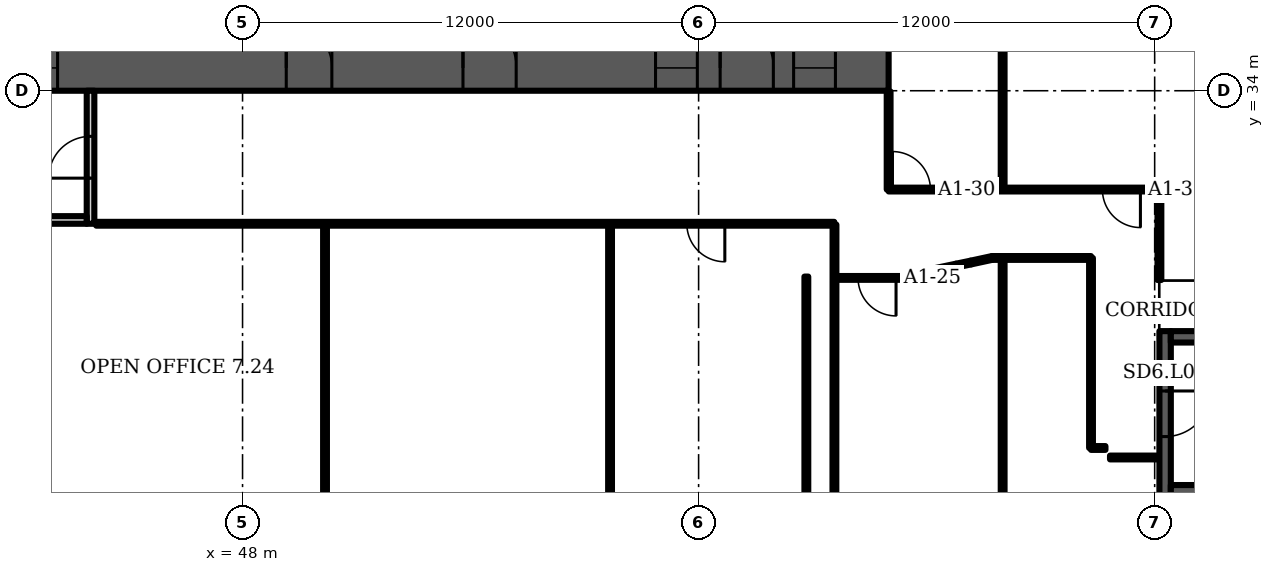
"""IFC4 building model, lengths in metres.
Left out: names, types, materials, properties, quantities, classifications, styles, units other than length and angle.
Written with IfcOpenShell. Run it as: python <this file> out.ifc"""

import sys

from ifc_helpers import new_model, si_unit, direction, frame, frame_2d, origin, place, context, subcontext, project, spatial, rectangle, extrude, element, fill, save


model = new_model("IFC4")
c1 = context("Model", 3, precision=1e-05, world=origin(), true_north=direction((0.0, 1.0)))
c2 = subcontext(c1, "Body", "Model", "MODEL_VIEW")
j1 = project(units=[si_unit("LENGTHUNIT", "METRE"), si_unit("PLANEANGLEUNIT", "RADIAN")], contexts=[c1])
p1 = place(None, origin())
s1 = spatial("IfcSite", under=j1, at=p1, CompositionType="ELEMENT")
p2 = place(p1, origin())
s2 = spatial("IfcBuilding", under=s1, at=p2, CompositionType="ELEMENT")
p3 = place(p2, frame((0.0, 0.0, 45.1)))
s3 = spatial("IfcBuildingStorey", under=s2, at=p3, CompositionType="ELEMENT", Elevation=45.1)
p4 = place(p3, frame((9.0, 34.6, 0.0), z_axis=(0.0, 0.0, 1.0), x_axis=(1.0, 0.0, 0.0)))
e1 = element("IfcWall", 1, at=p4, inside=s3, PredefinedType="SHEAR", context=c2, shape_type="SweptSolid", body=[
    extrude(rectangle(XDim=56.0, YDim=1.2, at=frame_2d((28.0, 0.0))), origin(), (0.0, 0.0, 1.0), 3.6),
])
p5 = place(p4, frame((2.0, 0.0, 0.0)))
e2 = element("IfcOpeningElement", 2, at=p5, cuts=e1, PredefinedType="OPENING", context=c2, shape_type="SweptSolid", body=[
    extrude(rectangle(XDim=1.0, YDim=2.1, at=frame_2d((0.5, 1.05))), frame((0.0, 0.61, 0.0), z_axis=(0.0, -1.0, 0.0), x_axis=(1.0, 0.0, 0.0)), (0.0, 0.0, 1.0), 1.22),
])
p6 = place(p4, frame((4.6, 0.0, 0.0)))
e3 = element("IfcOpeningElement", 3, at=p6, cuts=e1, PredefinedType="OPENING", context=c2, shape_type="SweptSolid", body=[
    extrude(rectangle(XDim=1.0, YDim=2.1, at=frame_2d((0.5, 1.05))), frame((0.0, 0.61, 0.0), z_axis=(0.0, -1.0, 0.0), x_axis=(1.0, 0.0, 0.0)), (0.0, 0.0, 1.0), 1.22),
])
p7 = place(p4, frame((7.867, 0.0, 0.0)))
e4 = element("IfcOpeningElement", 4, at=p7, cuts=e1, PredefinedType="OPENING", context=c2, shape_type="SweptSolid", body=[
    extrude(rectangle(XDim=1.1, YDim=2.1, at=frame_2d((0.55, 1.05))), frame((0.0, 0.61, 0.0), z_axis=(0.0, -1.0, 0.0), x_axis=(1.0, 0.0, 0.0)), (0.0, 0.0, 1.0), 1.22),
])
p8 = place(p4, frame((12.033, 0.0, 0.0)))
e5 = element("IfcOpeningElement", 5, at=p8, cuts=e1, PredefinedType="OPENING", context=c2, shape_type="SweptSolid", body=[
    extrude(rectangle(XDim=1.1, YDim=2.1, at=frame_2d((0.55, 1.05))), frame((0.0, 0.61, 0.0), z_axis=(0.0, -1.0, 0.0), x_axis=(1.0, 0.0, 0.0)), (0.0, 0.0, 1.0), 1.22),
])
p9 = place(p4, frame((9.8, 0.0, 0.0)))
e6 = element("IfcOpeningElement", 6, at=p9, cuts=e1, PredefinedType="OPENING", context=c2, shape_type="SweptSolid", body=[
    extrude(rectangle(XDim=1.4, YDim=2.1, at=frame_2d((0.7, 1.05))), frame((0.0, 0.61, 0.0), z_axis=(0.0, -1.0, 0.0), x_axis=(1.0, 0.0, 0.0)), (0.0, 0.0, 1.0), 1.22),
])
p10 = place(p4, frame((14.65, 0.0, 0.0)))
e7 = element("IfcOpeningElement", 7, at=p10, cuts=e1, PredefinedType="OPENING", context=c2, shape_type="SweptSolid", body=[
    extrude(rectangle(XDim=1.2, YDim=2.1, at=frame_2d((0.6, 1.05))), frame((0.0, 0.61, 0.0), z_axis=(0.0, -1.0, 0.0), x_axis=(1.0, 0.0, 0.0)), (0.0, 0.0, 1.0), 1.22),
])
p11 = place(p4, frame((21.867, 0.0, 0.0)))
e8 = element("IfcOpeningElement", 8, at=p11, cuts=e1, PredefinedType="OPENING", context=c2, shape_type="SweptSolid", body=[
    extrude(rectangle(XDim=1.1, YDim=2.1, at=frame_2d((0.55, 1.05))), frame((0.0, 0.61, 0.0), z_axis=(0.0, -1.0, 0.0), x_axis=(1.0, 0.0, 0.0)), (0.0, 0.0, 1.0), 1.22),
])
p12 = place(p4, frame((26.033, 0.0, 0.0)))
e9 = element("IfcOpeningElement", 9, at=p12, cuts=e1, PredefinedType="OPENING", context=c2, shape_type="SweptSolid", body=[
    extrude(rectangle(XDim=1.1, YDim=2.1, at=frame_2d((0.55, 1.05))), frame((0.0, 0.61, 0.0), z_axis=(0.0, -1.0, 0.0), x_axis=(1.0, 0.0, 0.0)), (0.0, 0.0, 1.0), 1.22),
])
p13 = place(p4, frame((23.8, 0.0, 0.0)))
e10 = element("IfcOpeningElement", 10, at=p13, cuts=e1, PredefinedType="OPENING", context=c2, shape_type="SweptSolid", body=[
    extrude(rectangle(XDim=1.4, YDim=2.1, at=frame_2d((0.7, 1.05))), frame((0.0, 0.61, 0.0), z_axis=(0.0, -1.0, 0.0), x_axis=(1.0, 0.0, 0.0)), (0.0, 0.0, 1.0), 1.22),
])
p14 = place(p4, frame((28.867, 0.0, 0.0)))
e11 = element("IfcOpeningElement", 11, at=p14, cuts=e1, PredefinedType="OPENING", context=c2, shape_type="SweptSolid", body=[
    extrude(rectangle(XDim=1.1, YDim=2.1, at=frame_2d((0.55, 1.05))), frame((0.0, 0.61, 0.0), z_axis=(0.0, -1.0, 0.0), x_axis=(1.0, 0.0, 0.0)), (0.0, 0.0, 1.0), 1.22),
])
p15 = place(p4, frame((33.033, 0.0, 0.0)))
e12 = element("IfcOpeningElement", 12, at=p15, cuts=e1, PredefinedType="OPENING", context=c2, shape_type="SweptSolid", body=[
    extrude(rectangle(XDim=1.1, YDim=2.1, at=frame_2d((0.55, 1.05))), frame((0.0, 0.61, 0.0), z_axis=(0.0, -1.0, 0.0), x_axis=(1.0, 0.0, 0.0)), (0.0, 0.0, 1.0), 1.22),
])
p16 = place(p4, frame((40.15, 0.0, 0.0)))
e13 = element("IfcOpeningElement", 13, at=p16, cuts=e1, PredefinedType="OPENING", context=c2, shape_type="SweptSolid", body=[
    extrude(rectangle(XDim=1.2, YDim=2.1, at=frame_2d((0.6, 1.05))), frame((0.0, 0.61, 0.0), z_axis=(0.0, -1.0, 0.0), x_axis=(1.0, 0.0, 0.0)), (0.0, 0.0, 1.0), 1.22),
])
p17 = place(p4, frame((44.8, 0.0, 0.0)))
e14 = element("IfcOpeningElement", 14, at=p17, cuts=e1, PredefinedType="OPENING", context=c2, shape_type="SweptSolid", body=[
    extrude(rectangle(XDim=1.4, YDim=2.1, at=frame_2d((0.7, 1.05))), frame((0.0, 0.61, 0.0), z_axis=(0.0, -1.0, 0.0), x_axis=(1.0, 0.0, 0.0)), (0.0, 0.0, 1.0), 1.22),
])
p18 = place(p4, frame((49.867, 0.0, 0.0)))
e15 = element("IfcOpeningElement", 15, at=p18, cuts=e1, PredefinedType="OPENING", context=c2, shape_type="SweptSolid", body=[
    extrude(rectangle(XDim=1.1, YDim=2.1, at=frame_2d((0.55, 1.05))), frame((0.0, 0.61, 0.0), z_axis=(0.0, -1.0, 0.0), x_axis=(1.0, 0.0, 0.0)), (0.0, 0.0, 1.0), 1.22),
])
p19 = place(p4, frame((53.5, 0.0, 0.0)))
e16 = element("IfcOpeningElement", 16, at=p19, cuts=e1, PredefinedType="OPENING", context=c2, shape_type="SweptSolid", body=[
    extrude(rectangle(XDim=1.1, YDim=2.1, at=frame_2d((0.55, 1.05))), frame((0.0, 0.61, 0.0), z_axis=(0.0, -1.0, 0.0), x_axis=(1.0, 0.0, 0.0)), (0.0, 0.0, 1.0), 1.22),
])
p20 = place(p4, frame((51.567, 0.0, 0.0)))
e17 = element("IfcOpeningElement", 17, at=p20, cuts=e1, PredefinedType="OPENING", context=c2, shape_type="SweptSolid", body=[
    extrude(rectangle(XDim=1.4, YDim=2.1, at=frame_2d((0.7, 1.05))), frame((0.0, 0.61, 0.0), z_axis=(0.0, -1.0, 0.0), x_axis=(1.0, 0.0, 0.0)), (0.0, 0.0, 1.0), 1.22),
])
p21 = place(p3, frame((44.0, 30.5, 0.0), z_axis=(0.0, 0.0, 1.0), x_axis=(0.0, 1.0, 0.0)))
e18 = element("IfcWall", 18, at=p21, inside=s3, PredefinedType="PARTITIONING", context=c2, shape_type="SweptSolid", body=[
    extrude(rectangle(XDim=3.5, YDim=0.2, at=frame_2d((1.75, 0.0))), origin(), (0.0, 0.0, 1.0), 3.2),
])
p22 = place(p21, frame((1.2, 0.0, 0.0)))
e19 = element("IfcOpeningElement", 19, at=p22, cuts=e18, PredefinedType="OPENING", context=c2, shape_type="SweptSolid", body=[
    extrude(rectangle(XDim=1.1, YDim=2.1, at=frame_2d((0.55, 1.05))), frame((0.0, 0.11, 0.0), z_axis=(0.0, -1.0, 0.0), x_axis=(1.0, 0.0, 0.0)), (0.0, 0.0, 1.0), 0.22),
])
p23 = place(p3, frame((41.1, 30.6, 0.0), z_axis=(0.0, 0.0, 1.0), x_axis=(1.0, 0.0, 0.0)))
e20 = element("IfcWall", 20, at=p23, inside=s3, PredefinedType="PARTITIONING", context=c2, shape_type="SweptSolid", body=[
    extrude(rectangle(XDim=2.8, YDim=0.2, at=frame_2d((1.4, 0.0))), origin(), (0.0, 0.0, 1.0), 3.2),
])
p24 = place(p3, frame((72.275, 23.325, 0.0), z_axis=(0.0, 0.0, 1.0), x_axis=(0.0, 1.0, 0.0)))
e21 = element("IfcWall", 21, at=p24, inside=s3, PredefinedType="SHEAR", context=c2, shape_type="SweptSolid", body=[
    extrude(rectangle(XDim=4.35, YDim=0.3, at=frame_2d((2.175, 0.0))), origin(), (0.0, 0.0, 1.0), 3.2),
])
p25 = place(p24, frame((1.575, 0.0, 0.0)))
e22 = element("IfcOpeningElement", 22, at=p25, cuts=e21, PredefinedType="OPENING", context=c2, shape_type="SweptSolid", body=[
    extrude(rectangle(XDim=1.2, YDim=2.1, at=frame_2d((0.6, 1.05))), frame((0.0, 0.16, 0.0), z_axis=(0.0, -1.0, 0.0), x_axis=(1.0, 0.0, 0.0)), (0.0, 0.0, 1.0), 0.32),
])
for number, where, z_axis, x_axis in (
    (23, (50.17, 14.24, 0.0), (0.0, 0.0, 1.0), (0.0, 1.0, 0.0)),
    (24, (57.67, 14.24, 0.0), (0.0, 0.0, 1.0), (0.0, 1.0, 0.0)),
):
    element("IfcWall", number, at=place(p3, frame(where, z_axis=z_axis, x_axis=x_axis)), inside=s3, PredefinedType="PARTITIONING", context=c2, shape_type="SweptSolid", body=[
        extrude(rectangle(XDim=16.26, YDim=0.1, at=frame_2d((8.13, 0.0))), origin(), (0.0, 0.0, 1.0), 3.2),
    ])
p26 = place(p3, frame((62.835, 20.175, 0.0), z_axis=(0.0, 0.0, 1.0), x_axis=(0.0, 1.0, 0.0)))
e25 = element("IfcWall", 25, at=p26, inside=s3, PredefinedType="PARTITIONING", context=c2, shape_type="SweptSolid", body=[
    extrude(rectangle(XDim=8.935, YDim=0.1, at=frame_2d((4.468, 0.0))), origin(), (0.0, 0.0, 1.0), 3.2),
])
p27 = place(p3, frame((63.57, 14.245, 0.0), z_axis=(0.0, 0.0, 1.0), x_axis=(0.000331, 1.000002, 0.0)))
e26 = element("IfcWall", 26, at=p27, inside=s3, PredefinedType="PARTITIONING", context=c2, shape_type="SweptSolid", body=[
    extrude(rectangle(XDim=16.233, YDim=0.1, at=frame_2d((8.117, 0.0))), origin(), (0.0, 0.0, 1.0), 3.2),
])
p28 = place(p3, frame((63.575, 29.075, 0.0), z_axis=(0.0, 0.0, 1.0), x_axis=(1.0, 0.0, 0.0)))
e27 = element("IfcWall", 27, at=p28, inside=s3, PredefinedType="PARTITIONING", context=c2, shape_type="SweptSolid", body=[
    extrude(rectangle(XDim=2.08, YDim=0.1, at=frame_2d((1.04, 0.0))), origin(), (0.0, 0.0, 1.0), 3.2),
])
p29 = place(p28, frame((0.62, 0.0, 0.0)))
e28 = element("IfcOpeningElement", 28, at=p29, cuts=e27, PredefinedType="OPENING", context=c2, shape_type="SweptSolid", body=[
    extrude(rectangle(XDim=1.0, YDim=2.1, at=frame_2d((0.5, 1.05))), frame((0.0, 0.06, 0.0), z_axis=(0.0, -1.0, 0.0), x_axis=(1.0, 0.0, 0.0)), (0.0, 0.0, 1.0), 0.12),
])
p30 = place(p3, frame((65.0, 31.4, 0.0), z_axis=(0.0, 0.0, 1.0), x_axis=(0.0, 1.0, 0.0)))
e29 = element("IfcWall", 29, at=p30, inside=s3, PredefinedType="PARTITIONING", context=c2, shape_type="SweptSolid", body=[
    extrude(rectangle(XDim=2.58, YDim=0.1, at=frame_2d((1.29, 0.0))), origin(), (0.0, 0.0, 1.0), 3.2),
])
p31 = place(p3, frame((65.0, 31.4, 0.0), z_axis=(0.0, 0.0, 1.0), x_axis=(1.0, 0.0, 0.0)))
e30 = element("IfcWall", 30, at=p31, inside=s3, PredefinedType="PARTITIONING", context=c2, shape_type="SweptSolid", body=[
    extrude(rectangle(XDim=7.125, YDim=0.1, at=frame_2d((3.562, 0.0))), origin(), (0.0, 0.0, 1.0), 3.2),
])
p32 = place(p31, frame((0.1, 0.0, 0.0)))
e31 = element("IfcOpeningElement", 31, at=p32, cuts=e30, PredefinedType="OPENING", context=c2, shape_type="SweptSolid", body=[
    extrude(rectangle(XDim=1.0, YDim=2.1, at=frame_2d((0.5, 1.05))), frame((0.0, 0.06, 0.0), z_axis=(0.0, -1.0, 0.0), x_axis=(1.0, 0.0, 0.0)), (0.0, 0.0, 1.0), 0.12),
])
p33 = place(p31, frame((5.625, 0.0, 0.0)))
e32 = element("IfcOpeningElement", 32, at=p33, cuts=e30, PredefinedType="OPENING", context=c2, shape_type="SweptSolid", body=[
    extrude(rectangle(XDim=1.0, YDim=2.1, at=frame_2d((0.5, 1.05))), frame((0.0, 0.06, 0.0), z_axis=(0.0, -1.0, 0.0), x_axis=(1.0, 0.0, 0.0)), (0.0, 0.0, 1.0), 0.12),
])
p34 = place(p3, frame((65.655, 29.075, 0.0), z_axis=(0.0, 0.0, 1.0), x_axis=(0.671773, 0.740757, 0.0)))
e33 = element("IfcWall", 33, at=p34, inside=s3, PredefinedType="PARTITIONING", context=c2, shape_type="SweptSolid", body=[
    extrude(rectangle(XDim=0.149, YDim=0.1, at=frame_2d((0.074, 0.0))), origin(), (0.0, 0.0, 1.0), 3.2),
])
p35 = place(p3, frame((65.755, 29.185, 0.0), z_axis=(0.0, 0.0, 1.0), x_axis=(0.978739, 0.205118, 0.0)))
e34 = element("IfcWall", 34, at=p35, inside=s3, PredefinedType="PARTITIONING", context=c2, shape_type="SweptSolid", body=[
    extrude(rectangle(XDim=1.047, YDim=0.1, at=frame_2d((0.524, 0.0))), origin(), (0.0, 0.0, 1.0), 3.2),
])
p36 = place(p3, frame((66.78, 29.4, 0.0), z_axis=(0.0, 0.0, 1.0), x_axis=(0.979048, 0.203632, 0.0)))
e35 = element("IfcWall", 35, at=p36, inside=s3, PredefinedType="PARTITIONING", context=c2, shape_type="SweptSolid", body=[
    extrude(rectangle(XDim=0.393, YDim=0.1, at=frame_2d((0.197, 0.0))), origin(), (0.0, 0.0, 1.0), 3.2),
])
p37 = place(p3, frame((67.165, 29.48, 0.0), z_axis=(0.0, 0.0, 1.0), x_axis=(0.977367, 0.211555, 0.0)))
e36 = element("IfcWall", 36, at=p37, inside=s3, PredefinedType="PARTITIONING", context=c2, shape_type="SweptSolid", body=[
    extrude(rectangle(XDim=0.568, YDim=0.1, at=frame_2d((0.284, 0.0))), origin(), (0.0, 0.0, 1.0), 3.2),
])
p38 = place(p3, frame((67.72, 29.6, 0.0), z_axis=(0.0, 0.0, 1.0), x_axis=(1.0, 0.0, 0.0)))
e37 = element("IfcWall", 37, at=p38, inside=s3, PredefinedType="PARTITIONING", context=c2, shape_type="SweptSolid", body=[
    extrude(rectangle(XDim=2.605, YDim=0.1, at=frame_2d((1.302, 0.0))), origin(), (0.0, 0.0, 1.0), 3.2),
])
p39 = place(p3, frame((68.0, 14.24, 0.0), z_axis=(0.0, 0.0, 1.0), x_axis=(0.0, 1.0, 0.0)))
e38 = element("IfcWall", 38, at=p39, inside=s3, PredefinedType="PARTITIONING", context=c2, shape_type="SweptSolid", body=[
    extrude(rectangle(XDim=15.36, YDim=0.1, at=frame_2d((7.68, 0.0))), origin(), (0.0, 0.0, 1.0), 3.2),
])
p40 = place(p3, frame((68.0, 31.4, 0.0), z_axis=(0.0, 0.0, 1.0), x_axis=(0.0, 1.0, 0.0)))
e39 = element("IfcWall", 39, at=p40, inside=s3, PredefinedType="PARTITIONING", context=c2, shape_type="SweptSolid", body=[
    extrude(rectangle(XDim=8.39, YDim=0.1, at=frame_2d((4.195, 0.0))), origin(), (0.0, 0.0, 1.0), 3.2),
])
p41 = place(p3, frame((70.325, 24.6, 0.0), z_axis=(0.0, 0.0, 1.0), x_axis=(0.0, 1.0, 0.0)))
e40 = element("IfcWall", 40, at=p41, inside=s3, PredefinedType="PARTITIONING", context=c2, shape_type="SweptSolid", body=[
    extrude(rectangle(XDim=5.0, YDim=0.1, at=frame_2d((2.5, 0.0))), origin(), (0.0, 0.0, 1.0), 3.2),
])
p42 = place(p3, frame((70.325, 24.6, 0.0), z_axis=(0.0, 0.0, 1.0), x_axis=(1.0, 0.0, 0.0)))
e41 = element("IfcWall", 41, at=p42, inside=s3, PredefinedType="PARTITIONING", context=c2, shape_type="SweptSolid", body=[
    extrude(rectangle(XDim=0.38, YDim=0.1, at=frame_2d((0.19, 0.0))), origin(), (0.0, 0.0, 1.0), 3.2),
])
p43 = place(p3, frame((70.825, 24.35, 0.0), z_axis=(0.0, 0.0, 1.0), x_axis=(1.0, 0.0, 0.0)))
e42 = element("IfcWall", 42, at=p43, inside=s3, PredefinedType="PARTITIONING", context=c2, shape_type="SweptSolid", body=[
    extrude(rectangle(XDim=1.28, YDim=0.1, at=frame_2d((0.64, 0.0))), origin(), (0.0, 0.0, 1.0), 3.2),
])
p44 = place(p3, frame((72.125, 29.02, 0.0), z_axis=(0.0, 0.0, 1.0), x_axis=(0.0, 1.0, 0.0)))
e43 = element("IfcWall", 43, at=p44, inside=s3, PredefinedType="PARTITIONING", context=c2, shape_type="SweptSolid", body=[
    extrude(rectangle(XDim=2.38, YDim=0.1, at=frame_2d((1.19, 0.0))), origin(), (0.0, 0.0, 1.0), 3.2),
])
p45 = place(p3, frame((44.15, 30.5, 0.0), z_axis=(0.0, 0.0, 1.0), x_axis=(1.0, 0.0, 0.0)))
e44 = element("IfcWall", 44, at=p45, inside=s3, PredefinedType="PARTITIONING", context=c2, shape_type="SweptSolid", body=[
    extrude(rectangle(XDim=19.42, YDim=0.1, at=frame_2d((9.71, 0.0))), origin(), (0.0, 0.0, 1.0), 3.2),
])
p46 = place(p45, frame((15.54, 0.0, 0.0)))
e45 = element("IfcOpeningElement", 45, at=p46, cuts=e44, PredefinedType="OPENING", context=c2, shape_type="SweptSolid", body=[
    extrude(rectangle(XDim=1.0, YDim=2.1, at=frame_2d((0.5, 1.05))), frame((0.0, 0.06, 0.0), z_axis=(0.0, -1.0, 0.0), x_axis=(1.0, 0.0, 0.0)), (0.0, 0.0, 1.0), 0.12),
])
for number, where, z_axis, x_axis in (
    (46, (72.425, 23.475, 0.0), (0.0, 0.0, 1.0), (1.0, 0.0, 0.0)),
    (47, (72.425, 27.525, 0.0), (0.0, 0.0, 1.0), (1.0, 0.0, 0.0)),
):
    element("IfcWall", number, at=place(p3, frame(where, z_axis=z_axis, x_axis=x_axis)), inside=s3, PredefinedType="SHEAR", context=c2, shape_type="SweptSolid", body=[
        extrude(rectangle(XDim=7.5, YDim=0.3, at=frame_2d((3.75, 0.0))), origin(), (0.0, 0.0, 1.0), 3.2),
    ])
p47 = place(p15, origin())
e48 = element("IfcDoor", 48, at=p47, inside=s3, OperationType="DOUBLE_DOOR_SLIDING", PredefinedType="DOOR", context=c2, shape_type="SweptSolid", body=[
    extrude(rectangle(XDim=1.1, YDim=2.1, at=frame_2d((0.55, 1.05))), frame((0.0, 0.025, 0.0), z_axis=(0.0, -1.0, 0.0), x_axis=(1.0, 0.0, 0.0)), (0.0, 0.0, 1.0), 0.05),
])
fill(e12, e48)
p48 = place(p16, origin())
e49 = element("IfcDoor", 49, at=p48, inside=s3, OperationType="SINGLE_SWING_LEFT", PredefinedType="DOOR", context=c2, shape_type="SweptSolid", body=[
    extrude(rectangle(XDim=1.2, YDim=2.1, at=frame_2d((0.6, 1.05))), frame((0.0, 0.025, 0.0), z_axis=(0.0, -1.0, 0.0), x_axis=(1.0, 0.0, 0.0)), (0.0, 0.0, 1.0), 0.05),
])
fill(e13, e49)
p49 = place(p17, origin())
e50 = element("IfcDoor", 50, at=p49, inside=s3, OperationType="DOUBLE_DOOR_SINGLE_SWING", PredefinedType="DOOR", context=c2, shape_type="SweptSolid", body=[
    extrude(rectangle(XDim=1.4, YDim=2.1, at=frame_2d((0.7, 1.05))), frame((0.0, 0.025, 0.0), z_axis=(0.0, -1.0, 0.0), x_axis=(1.0, 0.0, 0.0)), (0.0, 0.0, 1.0), 0.05),
])
fill(e14, e50)
p50 = place(p18, origin())
e51 = element("IfcDoor", 51, at=p50, inside=s3, OperationType="DOUBLE_DOOR_SLIDING", PredefinedType="DOOR", context=c2, shape_type="SweptSolid", body=[
    extrude(rectangle(XDim=1.1, YDim=2.1, at=frame_2d((0.55, 1.05))), frame((0.0, 0.025, 0.0), z_axis=(0.0, -1.0, 0.0), x_axis=(1.0, 0.0, 0.0)), (0.0, 0.0, 1.0), 0.05),
])
fill(e15, e51)
p51 = place(p19, origin())
e52 = element("IfcDoor", 52, at=p51, inside=s3, OperationType="DOUBLE_DOOR_SLIDING", PredefinedType="DOOR", context=c2, shape_type="SweptSolid", body=[
    extrude(rectangle(XDim=1.1, YDim=2.1, at=frame_2d((0.55, 1.05))), frame((0.0, 0.025, 0.0), z_axis=(0.0, -1.0, 0.0), x_axis=(1.0, 0.0, 0.0)), (0.0, 0.0, 1.0), 0.05),
])
fill(e16, e52)
p52 = place(p20, origin())
e53 = element("IfcDoor", 53, at=p52, inside=s3, OperationType="DOUBLE_DOOR_SINGLE_SWING", PredefinedType="DOOR", context=c2, shape_type="SweptSolid", body=[
    extrude(rectangle(XDim=1.4, YDim=2.1, at=frame_2d((0.7, 1.05))), frame((0.0, 0.025, 0.0), z_axis=(0.0, -1.0, 0.0), x_axis=(1.0, 0.0, 0.0)), (0.0, 0.0, 1.0), 0.05),
])
fill(e17, e53)
p53 = place(p22, origin())
e54 = element("IfcDoor", 54, at=p53, inside=s3, OperationType="SINGLE_SWING_LEFT", PredefinedType="DOOR", context=c2, shape_type="SweptSolid", body=[
    extrude(rectangle(XDim=1.1, YDim=2.1, at=frame_2d((0.55, 1.05))), frame((0.0, 0.025, 0.0), z_axis=(0.0, -1.0, 0.0), x_axis=(1.0, 0.0, 0.0)), (0.0, 0.0, 1.0), 0.05),
])
fill(e19, e54)
p54 = place(p25, origin())
e55 = element("IfcDoor", 55, at=p54, inside=s3, OperationType="SINGLE_SWING_RIGHT", PredefinedType="DOOR", context=c2, shape_type="SweptSolid", body=[
    extrude(rectangle(XDim=1.2, YDim=2.1, at=frame_2d((0.6, 1.05))), frame((0.0, 0.025, 0.0), z_axis=(0.0, -1.0, 0.0), x_axis=(1.0, 0.0, 0.0)), (0.0, 0.0, 1.0), 0.05),
])
fill(e22, e55)
p55 = place(p29, origin())
e56 = element("IfcDoor", 56, at=p55, inside=s3, OperationType="SINGLE_SWING_RIGHT", PredefinedType="DOOR", context=c2, shape_type="SweptSolid", body=[
    extrude(rectangle(XDim=1.0, YDim=2.1, at=frame_2d((0.5, 1.05))), frame((0.0, 0.025, 0.0), z_axis=(0.0, -1.0, 0.0), x_axis=(1.0, 0.0, 0.0)), (0.0, 0.0, 1.0), 0.05),
])
fill(e28, e56)
p56 = place(p46, origin())
e57 = element("IfcDoor", 57, at=p56, inside=s3, OperationType="SINGLE_SWING_RIGHT", PredefinedType="DOOR", context=c2, shape_type="SweptSolid", body=[
    extrude(rectangle(XDim=1.0, YDim=2.1, at=frame_2d((0.5, 1.05))), frame((0.0, 0.025, 0.0), z_axis=(0.0, -1.0, 0.0), x_axis=(1.0, 0.0, 0.0)), (0.0, 0.0, 1.0), 0.05),
])
fill(e45, e57)
p57 = place(p32, origin())
e58 = element("IfcDoor", 58, at=p57, inside=s3, OperationType="SINGLE_SWING_LEFT", PredefinedType="DOOR", context=c2, shape_type="SweptSolid", body=[
    extrude(rectangle(XDim=1.0, YDim=2.1, at=frame_2d((0.5, 1.05))), frame((0.0, 0.025, 0.0), z_axis=(0.0, -1.0, 0.0), x_axis=(1.0, 0.0, 0.0)), (0.0, 0.0, 1.0), 0.05),
])
fill(e31, e58)
p58 = place(p33, origin())
e59 = element("IfcDoor", 59, at=p58, inside=s3, OperationType="SINGLE_SWING_RIGHT", PredefinedType="DOOR", context=c2, shape_type="SweptSolid", body=[
    extrude(rectangle(XDim=1.0, YDim=2.1, at=frame_2d((0.5, 1.05))), frame((0.0, 0.025, 0.0), z_axis=(0.0, -1.0, 0.0), x_axis=(1.0, 0.0, 0.0)), (0.0, 0.0, 1.0), 0.05),
])
fill(e32, e59)
save(model, sys.argv[1])
